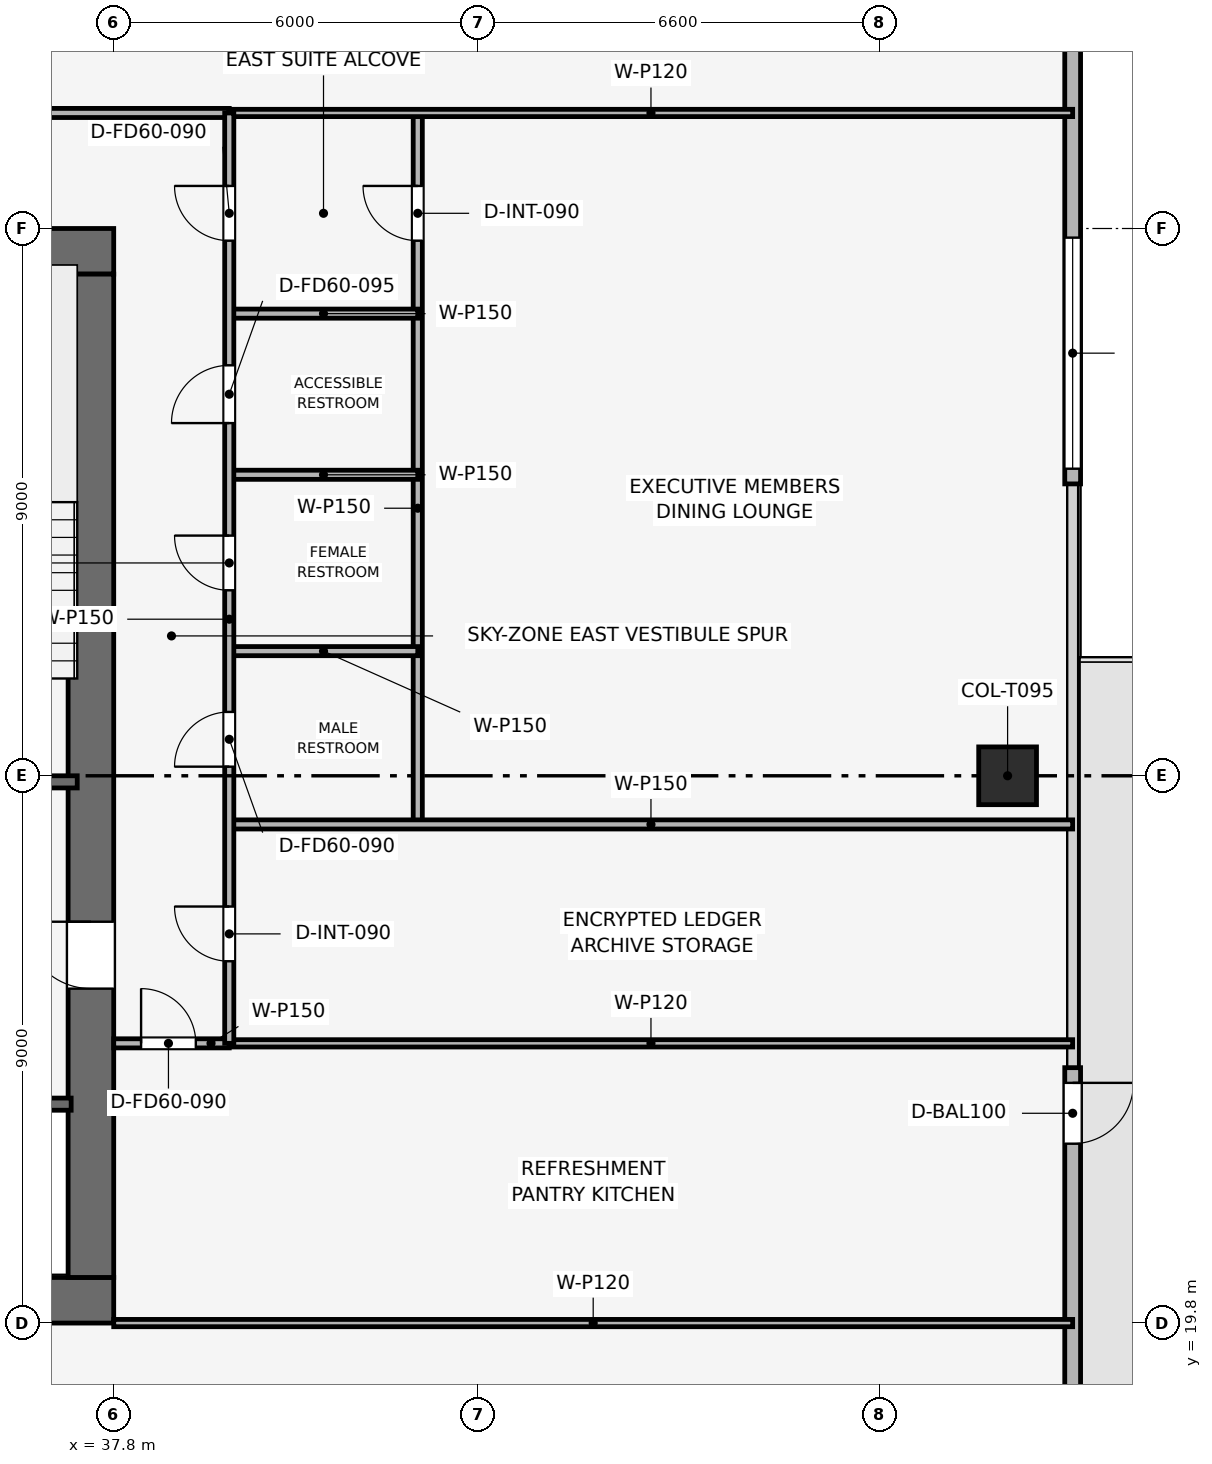
"""IFC4 building model, lengths in metres.
Left out: names, types, materials, properties, quantities, classifications, styles, units other than length and angle.
Written with IfcOpenShell. Run it as: python <this file> out.ifc"""

import sys

from ifc_helpers import new_model, si_unit, direction, frame, frame_2d, origin, origin_2d, place, context, subcontext, project, spatial, rectangle, extrude, element, fill, save


model = new_model("IFC4")
c1 = context("Model", 3, precision=1e-05, world=origin(), true_north=direction((0.0, 1.0)))
c2 = subcontext(c1, "Body", "Model", "MODEL_VIEW")
j1 = project(units=[si_unit("LENGTHUNIT", "METRE"), si_unit("PLANEANGLEUNIT", "RADIAN")], contexts=[c1])
p1 = place(None, origin())
s1 = spatial("IfcSite", under=j1, at=p1, CompositionType="ELEMENT")
p2 = place(p1, origin())
s2 = spatial("IfcBuilding", under=s1, at=p2, CompositionType="ELEMENT")
p3 = place(p2, frame((0.0, 0.0, 254.1)))
s3 = spatial("IfcBuildingStorey", under=s2, at=p3, CompositionType="ELEMENT", Elevation=254.1)
p4 = place(p3, frame((19.8, 20.175, 0.0), z_axis=(0.0, 0.0, 1.0), x_axis=(1.0, 0.0, 0.0)))
e1 = element("IfcWall", 1, at=p4, inside=s3, PredefinedType="SHEAR", context=c2, shape_type="SweptSolid", body=[
    extrude(rectangle(XDim=18.0, YDim=0.75, at=frame_2d((9.0, 0.0))), origin(), (0.0, 0.0, 1.0), 3.75),
])
p5 = place(p3, frame((19.8, 37.425, 0.0), z_axis=(0.0, 0.0, 1.0), x_axis=(1.0, 0.0, 0.0)))
e2 = element("IfcWall", 2, at=p5, inside=s3, PredefinedType="SHEAR", context=c2, shape_type="SweptSolid", body=[
    extrude(rectangle(XDim=18.0, YDim=0.75, at=frame_2d((9.0, 0.0))), origin(), (0.0, 0.0, 1.0), 3.75),
])
p6 = place(p5, frame((7.05, 0.0, 0.0)))
e3 = element("IfcOpeningElement", 3, at=p6, cuts=e2, PredefinedType="OPENING", context=c2, shape_type="SweptSolid", body=[
    extrude(rectangle(XDim=1.1, YDim=2.15, at=frame_2d((0.55, 1.075))), frame((0.0, 0.385, 0.0), z_axis=(0.0, -1.0, 0.0), x_axis=(1.0, 0.0, 0.0)), (0.0, 0.0, 1.0), 0.77),
])
p7 = place(p3, frame((37.425, 20.55, 0.0), z_axis=(0.0, 0.0, 1.0), x_axis=(0.0, 1.0, 0.0)))
e4 = element("IfcWall", 4, at=p7, inside=s3, PredefinedType="SHEAR", context=c2, shape_type="SweptSolid", body=[
    extrude(rectangle(XDim=16.5, YDim=0.75, at=frame_2d((8.25, 0.0))), origin(), (0.0, 0.0, 1.0), 3.75),
])
p8 = place(p7, frame((4.75, 0.0, 0.0)))
e5 = element("IfcOpeningElement", 5, at=p8, cuts=e4, PredefinedType="OPENING", context=c2, shape_type="SweptSolid", body=[
    extrude(rectangle(XDim=1.1, YDim=2.15, at=frame_2d((0.55, 1.075))), frame((0.0, 0.385, 0.0), z_axis=(0.0, -1.0, 0.0), x_axis=(1.0, 0.0, 0.0)), (0.0, 0.0, 1.0), 0.77),
])
p9 = place(p3, frame((52.5, 28.8, 0.003), z_axis=(0.0, 0.0, 1.0), x_axis=(1.0, 0.0, 0.0)))
e6 = element("IfcColumn", 6, at=p9, inside=s3, PredefinedType="COLUMN", context=c2, shape_type="SweptSolid", body=[
    extrude(rectangle(XDim=0.95, YDim=0.95, at=origin_2d()), origin(), (0.0, 0.0, 1.0), 3.494),
])
p10 = place(p3, frame((53.57, 46.8, 0.0), z_axis=(0.0, 0.0, 1.0), x_axis=(0.0, -1.0, 0.0)))
e7 = element("IfcWall", 7, at=p10, inside=s3, PredefinedType="SOLIDWALL", context=c2, shape_type="SweptSolid", body=[
    extrude(rectangle(XDim=13.2, YDim=0.26, at=frame_2d((6.6, 0.0))), origin(), (0.0, 0.0, 1.0), 3.5),
])
p11 = place(p10, frame((9.15, 0.0, 0.9)))
e8 = element("IfcOpeningElement", 8, at=p11, cuts=e7, PredefinedType="OPENING", context=c2, shape_type="SweptSolid", body=[
    extrude(rectangle(XDim=3.8, YDim=1.9, at=frame_2d((1.9, 0.95))), frame((0.0, 0.14, 0.0), z_axis=(0.0, -1.0, 0.0), x_axis=(1.0, 0.0, 0.0)), (0.0, 0.0, 1.0), 0.28),
])
p12 = place(p3, frame((53.57, 24.0, 0.0), z_axis=(0.0, 0.0, 1.0), x_axis=(0.0, -1.0, 0.0)))
e9 = element("IfcWall", 9, at=p12, inside=s3, PredefinedType="SOLIDWALL", context=c2, shape_type="SweptSolid", body=[
    extrude(rectangle(XDim=13.2, YDim=0.26, at=frame_2d((6.6, 0.0))), origin(), (0.0, 0.0, 1.0), 3.5),
])
p13 = place(p12, frame((0.25, 0.0, 0.0)))
e10 = element("IfcOpeningElement", 10, at=p13, cuts=e9, PredefinedType="OPENING", context=c2, shape_type="SweptSolid", body=[
    extrude(rectangle(XDim=1.0, YDim=2.2, at=frame_2d((0.5, 1.1))), frame((0.0, 0.14, 0.0), z_axis=(0.0, -1.0, 0.0), x_axis=(1.0, 0.0, 0.0)), (0.0, 0.0, 1.0), 0.28),
])
p14 = place(p3, frame((34.05, 28.7, 0.0), z_axis=(0.0, 0.0, 1.0), x_axis=(1.0, 0.0, 0.0)))
e11 = element("IfcWall", 11, at=p14, inside=s3, PredefinedType="SHEAR", context=c2, shape_type="SweptSolid", body=[
    extrude(rectangle(XDim=3.15, YDim=0.2, at=frame_2d((1.575, 0.0))), origin(), (0.0, 0.0, 1.0), 3.5),
])
p15 = place(p14, frame((0.8, 0.0, 0.0)))
e12 = element("IfcOpeningElement", 12, at=p15, cuts=e11, PredefinedType="OPENING", context=c2, shape_type="SweptSolid", body=[
    extrude(rectangle(XDim=1.0, YDim=2.1, at=frame_2d((0.5, 1.05))), frame((0.0, 0.11, 0.0), z_axis=(0.0, -1.0, 0.0), x_axis=(1.0, 0.0, 0.0)), (0.0, 0.0, 1.0), 0.22),
])
p16 = place(p3, frame((34.05, 23.4, 0.0), z_axis=(0.0, 0.0, 1.0), x_axis=(1.0, 0.0, 0.0)))
e13 = element("IfcWall", 13, at=p16, inside=s3, PredefinedType="SHEAR", context=c2, shape_type="SweptSolid", body=[
    extrude(rectangle(XDim=3.05, YDim=0.2, at=frame_2d((1.525, 0.0))), origin(), (0.0, 0.0, 1.0), 3.5),
])
p17 = place(p16, frame((1.2, 0.0, 0.0)))
e14 = element("IfcOpeningElement", 14, at=p17, cuts=e13, PredefinedType="OPENING", context=c2, shape_type="SweptSolid", body=[
    extrude(rectangle(XDim=1.1, YDim=2.15, at=frame_2d((0.55, 1.075))), frame((0.0, 0.11, 0.0), z_axis=(0.0, -1.0, 0.0), x_axis=(1.0, 0.0, 0.0)), (0.0, 0.0, 1.0), 0.22),
])
p18 = place(p3, frame((37.8, 19.8, 0.0), z_axis=(0.0, 0.0, 1.0), x_axis=(1.0, 0.0, 0.0)))
e15 = element("IfcWall", 15, at=p18, inside=s3, PredefinedType="PARTITIONING", context=c2, shape_type="SweptSolid", body=[
    extrude(rectangle(XDim=15.77, YDim=0.12, at=frame_2d((7.885, 0.0))), origin(), (0.0, 0.0, 1.0), 3.085),
])
p19 = place(p3, frame((37.8, 24.4, 0.0), z_axis=(0.0, 0.0, 1.0), x_axis=(1.0, 0.0, 0.0)))
e16 = element("IfcWall", 16, at=p19, inside=s3, PredefinedType="PARTITIONING", context=c2, shape_type="SweptSolid", body=[
    extrude(rectangle(XDim=1.9, YDim=0.15, at=frame_2d((0.95, 0.0))), origin(), (0.0, 0.0, 1.0), 3.5),
])
p20 = place(p19, frame((0.45, 0.0, 0.0)))
e17 = element("IfcOpeningElement", 17, at=p20, cuts=e16, PredefinedType="OPENING", context=c2, shape_type="SweptSolid", body=[
    extrude(rectangle(XDim=0.9, YDim=2.1, at=frame_2d((0.45, 1.05))), frame((0.0, 0.085, 0.0), z_axis=(0.0, -1.0, 0.0), x_axis=(1.0, 0.0, 0.0)), (0.0, 0.0, 1.0), 0.17),
])
p21 = place(p3, frame((39.7, 24.4, 0.0), z_axis=(0.0, 0.0, 1.0), x_axis=(1.0, 0.0, 0.0)))
e18 = element("IfcWall", 18, at=p21, inside=s3, PredefinedType="PARTITIONING", context=c2, shape_type="SweptSolid", body=[
    extrude(rectangle(XDim=13.87, YDim=0.12, at=frame_2d((6.935, 0.0))), origin(), (0.0, 0.0, 1.0), 3.085),
])
p22 = place(p3, frame((42.8, 28.0, 0.0), z_axis=(0.0, 0.0, 1.0), x_axis=(0.0, 1.0, 0.0)))
e19 = element("IfcWall", 19, at=p22, inside=s3, PredefinedType="PARTITIONING", context=c2, shape_type="SweptSolid", body=[
    extrude(rectangle(XDim=11.7, YDim=0.15, at=frame_2d((5.85, 0.0))), origin(), (0.0, 0.0, 1.0), 3.085),
])
p23 = place(p22, frame((9.6, 0.0, 0.0)))
e20 = element("IfcOpeningElement", 20, at=p23, cuts=e19, PredefinedType="OPENING", context=c2, shape_type="SweptSolid", body=[
    extrude(rectangle(XDim=0.9, YDim=2.1, at=frame_2d((0.45, 1.05))), frame((0.0, 0.085, 0.0), z_axis=(0.0, -1.0, 0.0), x_axis=(1.0, 0.0, 0.0)), (0.0, 0.0, 1.0), 0.17),
])
p24 = place(p3, frame((39.7, 28.0, 0.0), z_axis=(0.0, 0.0, 1.0), x_axis=(1.0, 0.0, 0.0)))
e21 = element("IfcWall", 21, at=p24, inside=s3, PredefinedType="PARTITIONING", context=c2, shape_type="SweptSolid", body=[
    extrude(rectangle(XDim=13.87, YDim=0.15, at=frame_2d((6.935, 0.0))), origin(), (0.0, 0.0, 1.0), 3.085),
])
for number, where, z_axis, x_axis in (
    (22, (39.7, 36.4, 0.0), (0.0, 0.0, 1.0), (1.0, 0.0, 0.0)),
    (23, (39.7, 30.85, 0.0), (0.0, 0.0, 1.0), (1.0, 0.0, 0.0)),
    (24, (39.7, 33.75, 0.0), (0.0, 0.0, 1.0), (1.0, 0.0, 0.0)),
):
    element("IfcWall", number, at=place(p3, frame(where, z_axis=z_axis, x_axis=x_axis)), inside=s3, PredefinedType="PARTITIONING", context=c2, shape_type="SweptSolid", body=[
        extrude(rectangle(XDim=3.1, YDim=0.15, at=frame_2d((1.55, 0.0))), origin(), (0.0, 0.0, 1.0), 3.5),
    ])
p25 = place(p3, frame((39.7, 39.7, 0.0), z_axis=(0.0, 0.0, 1.0), x_axis=(1.0, 0.0, 0.0)))
e25 = element("IfcWall", 25, at=p25, inside=s3, PredefinedType="PARTITIONING", context=c2, shape_type="SweptSolid", body=[
    extrude(rectangle(XDim=13.87, YDim=0.12, at=frame_2d((6.935, 0.0))), origin(), (0.0, 0.0, 1.0), 3.085),
])
p26 = place(p3, frame((17.9, 39.7, 0.0), z_axis=(0.0, 0.0, 1.0), x_axis=(1.0, 0.0, 0.0)))
e26 = element("IfcWall", 26, at=p26, inside=s3, PredefinedType="PARTITIONING", context=c2, shape_type="SweptSolid", body=[
    extrude(rectangle(XDim=21.8, YDim=0.15, at=frame_2d((10.9, 0.0))), origin(), (0.0, 0.0, 1.0), 3.085),
])
p27 = place(p26, frame((0.7, 0.0, 0.0)))
e27 = element("IfcOpeningElement", 27, at=p27, cuts=e26, PredefinedType="OPENING", context=c2, shape_type="SweptSolid", body=[
    extrude(rectangle(XDim=0.9, YDim=2.1, at=frame_2d((0.45, 1.05))), frame((0.0, 0.085, 0.0), z_axis=(0.0, -1.0, 0.0), x_axis=(1.0, 0.0, 0.0)), (0.0, 0.0, 1.0), 0.17),
])
p28 = place(p26, frame((4.801, 0.0, 0.0)))
e28 = element("IfcOpeningElement", 28, at=p28, cuts=e26, PredefinedType="OPENING", context=c2, shape_type="SweptSolid", body=[
    extrude(rectangle(XDim=0.9, YDim=2.1, at=frame_2d((0.45, 1.05))), frame((0.0, 0.085, 0.0), z_axis=(0.0, -1.0, 0.0), x_axis=(1.0, 0.0, 0.0)), (0.0, 0.0, 1.0), 0.17),
])
p29 = place(p26, frame((10.535, 0.0, 0.0)))
e29 = element("IfcOpeningElement", 29, at=p29, cuts=e26, PredefinedType="OPENING", context=c2, shape_type="SweptSolid", body=[
    extrude(rectangle(XDim=0.9, YDim=2.1, at=frame_2d((0.45, 1.05))), frame((0.0, 0.085, 0.0), z_axis=(0.0, -1.0, 0.0), x_axis=(1.0, 0.0, 0.0)), (0.0, 0.0, 1.0), 0.17),
])
p30 = place(p26, frame((17.334, 0.0, 0.0)))
e30 = element("IfcOpeningElement", 30, at=p30, cuts=e26, PredefinedType="OPENING", context=c2, shape_type="SweptSolid", body=[
    extrude(rectangle(XDim=0.9, YDim=2.1, at=frame_2d((0.45, 1.05))), frame((0.0, 0.085, 0.0), z_axis=(0.0, -1.0, 0.0), x_axis=(1.0, 0.0, 0.0)), (0.0, 0.0, 1.0), 0.17),
])
p31 = place(p3, frame((39.7, 24.4, 0.0), z_axis=(0.0, 0.0, 1.0), x_axis=(0.0, 1.0, 0.0)))
e31 = element("IfcWall", 31, at=p31, inside=s3, PredefinedType="PARTITIONING", context=c2, shape_type="SweptSolid", body=[
    extrude(rectangle(XDim=15.3, YDim=0.15, at=frame_2d((7.65, 0.0))), origin(), (0.0, 0.0, 1.0), 3.085),
])
p32 = place(p31, frame((1.35, 0.0, 0.0)))
e32 = element("IfcOpeningElement", 32, at=p32, cuts=e31, PredefinedType="OPENING", context=c2, shape_type="SweptSolid", body=[
    extrude(rectangle(XDim=0.9, YDim=2.1, at=frame_2d((0.45, 1.05))), frame((0.0, 0.085, 0.0), z_axis=(0.0, -1.0, 0.0), x_axis=(1.0, 0.0, 0.0)), (0.0, 0.0, 1.0), 0.17),
])
p33 = place(p31, frame((4.55, 0.0, 0.0)))
e33 = element("IfcOpeningElement", 33, at=p33, cuts=e31, PredefinedType="OPENING", context=c2, shape_type="SweptSolid", body=[
    extrude(rectangle(XDim=0.9, YDim=2.1, at=frame_2d((0.45, 1.05))), frame((0.0, 0.085, 0.0), z_axis=(0.0, -1.0, 0.0), x_axis=(1.0, 0.0, 0.0)), (0.0, 0.0, 1.0), 0.17),
])
p34 = place(p31, frame((7.45, 0.0, 0.0)))
e34 = element("IfcOpeningElement", 34, at=p34, cuts=e31, PredefinedType="OPENING", context=c2, shape_type="SweptSolid", body=[
    extrude(rectangle(XDim=0.9, YDim=2.1, at=frame_2d((0.45, 1.05))), frame((0.0, 0.085, 0.0), z_axis=(0.0, -1.0, 0.0), x_axis=(1.0, 0.0, 0.0)), (0.0, 0.0, 1.0), 0.17),
])
p35 = place(p31, frame((10.2, 0.0, 0.0)))
e35 = element("IfcOpeningElement", 35, at=p35, cuts=e31, PredefinedType="OPENING", context=c2, shape_type="SweptSolid", body=[
    extrude(rectangle(XDim=0.95, YDim=2.1, at=frame_2d((0.475, 1.05))), frame((0.0, 0.085, 0.0), z_axis=(0.0, -1.0, 0.0), x_axis=(1.0, 0.0, 0.0)), (0.0, 0.0, 1.0), 0.17),
])
p36 = place(p31, frame((13.2, 0.0, 0.0)))
e36 = element("IfcOpeningElement", 36, at=p36, cuts=e31, PredefinedType="OPENING", context=c2, shape_type="SweptSolid", body=[
    extrude(rectangle(XDim=0.9, YDim=2.1, at=frame_2d((0.45, 1.05))), frame((0.0, 0.085, 0.0), z_axis=(0.0, -1.0, 0.0), x_axis=(1.0, 0.0, 0.0)), (0.0, 0.0, 1.0), 0.17),
])
p37 = place(p13, origin())
e37 = element("IfcDoor", 37, at=p37, inside=s3, OperationType="SINGLE_SWING_LEFT", PredefinedType="DOOR", context=c2, shape_type="SweptSolid", body=[
    extrude(rectangle(XDim=1.0, YDim=2.2, at=frame_2d((0.5, 1.1))), frame((0.0, 0.025, 0.0), z_axis=(0.0, -1.0, 0.0), x_axis=(1.0, 0.0, 0.0)), (0.0, 0.0, 1.0), 0.05),
])
fill(e10, e37)
p38 = place(p11, origin())
e38 = element("IfcWindow", 38, at=p38, inside=s3, PartitioningType="SINGLE_PANEL", PredefinedType="WINDOW", context=c2, shape_type="SweptSolid", body=[
    extrude(rectangle(XDim=3.8, YDim=1.9, at=frame_2d((1.9, 0.95))), frame((0.0, 0.03, 0.0), z_axis=(0.0, -1.0, 0.0), x_axis=(1.0, 0.0, 0.0)), (0.0, 0.0, 1.0), 0.06),
])
fill(e8, e38)
p39 = place(p20, origin())
e39 = element("IfcDoor", 39, at=p39, inside=s3, OperationType="SINGLE_SWING_LEFT", PredefinedType="DOOR", context=c2, shape_type="SweptSolid", body=[
    extrude(rectangle(XDim=0.9, YDim=2.1, at=frame_2d((0.45, 1.05))), frame((0.0, 0.025, 0.0), z_axis=(0.0, -1.0, 0.0), x_axis=(1.0, 0.0, 0.0)), (0.0, 0.0, 1.0), 0.05),
])
fill(e17, e39)
p40 = place(p23, origin())
e40 = element("IfcDoor", 40, at=p40, inside=s3, OperationType="SINGLE_SWING_RIGHT", PredefinedType="DOOR", context=c2, shape_type="SweptSolid", body=[
    extrude(rectangle(XDim=0.9, YDim=2.1, at=frame_2d((0.45, 1.05))), frame((0.0, 0.025, 0.0), z_axis=(0.0, -1.0, 0.0), x_axis=(1.0, 0.0, 0.0)), (0.0, 0.0, 1.0), 0.05),
])
fill(e20, e40)
p41 = place(p32, origin())
e41 = element("IfcDoor", 41, at=p41, inside=s3, OperationType="SINGLE_SWING_RIGHT", PredefinedType="DOOR", context=c2, shape_type="SweptSolid", body=[
    extrude(rectangle(XDim=0.9, YDim=2.1, at=frame_2d((0.45, 1.05))), frame((0.0, 0.025, 0.0), z_axis=(0.0, -1.0, 0.0), x_axis=(1.0, 0.0, 0.0)), (0.0, 0.0, 1.0), 0.05),
])
fill(e32, e41)
p42 = place(p33, origin())
e42 = element("IfcDoor", 42, at=p42, inside=s3, OperationType="SINGLE_SWING_LEFT", PredefinedType="DOOR", context=c2, shape_type="SweptSolid", body=[
    extrude(rectangle(XDim=0.9, YDim=2.1, at=frame_2d((0.45, 1.05))), frame((0.0, 0.025, 0.0), z_axis=(0.0, -1.0, 0.0), x_axis=(1.0, 0.0, 0.0)), (0.0, 0.0, 1.0), 0.05),
])
fill(e33, e42)
p43 = place(p34, origin())
e43 = element("IfcDoor", 43, at=p43, inside=s3, OperationType="SINGLE_SWING_RIGHT", PredefinedType="DOOR", context=c2, shape_type="SweptSolid", body=[
    extrude(rectangle(XDim=0.9, YDim=2.1, at=frame_2d((0.45, 1.05))), frame((0.0, 0.025, 0.0), z_axis=(0.0, -1.0, 0.0), x_axis=(1.0, 0.0, 0.0)), (0.0, 0.0, 1.0), 0.05),
])
fill(e34, e43)
p44 = place(p35, origin())
e44 = element("IfcDoor", 44, at=p44, inside=s3, OperationType="SINGLE_SWING_LEFT", PredefinedType="DOOR", context=c2, shape_type="SweptSolid", body=[
    extrude(rectangle(XDim=0.95, YDim=2.1, at=frame_2d((0.475, 1.05))), frame((0.0, 0.025, 0.0), z_axis=(0.0, -1.0, 0.0), x_axis=(1.0, 0.0, 0.0)), (0.0, 0.0, 1.0), 0.05),
])
fill(e35, e44)
p45 = place(p36, origin())
e45 = element("IfcDoor", 45, at=p45, inside=s3, OperationType="SINGLE_SWING_RIGHT", PredefinedType="DOOR", context=c2, shape_type="SweptSolid", body=[
    extrude(rectangle(XDim=0.9, YDim=2.1, at=frame_2d((0.45, 1.05))), frame((0.0, 0.025, 0.0), z_axis=(0.0, -1.0, 0.0), x_axis=(1.0, 0.0, 0.0)), (0.0, 0.0, 1.0), 0.05),
])
fill(e36, e45)
p46 = place(p8, origin())
e46 = element("IfcDoor", 46, at=p46, inside=s3, OperationType="SINGLE_SWING_RIGHT", PredefinedType="DOOR", context=c2, shape_type="SweptSolid", body=[
    extrude(rectangle(XDim=1.1, YDim=2.15, at=frame_2d((0.55, 1.075))), frame((0.0, 0.025, 0.0), z_axis=(0.0, -1.0, 0.0), x_axis=(1.0, 0.0, 0.0)), (0.0, 0.0, 1.0), 0.05),
])
fill(e5, e46)
save(model, sys.argv[1])
